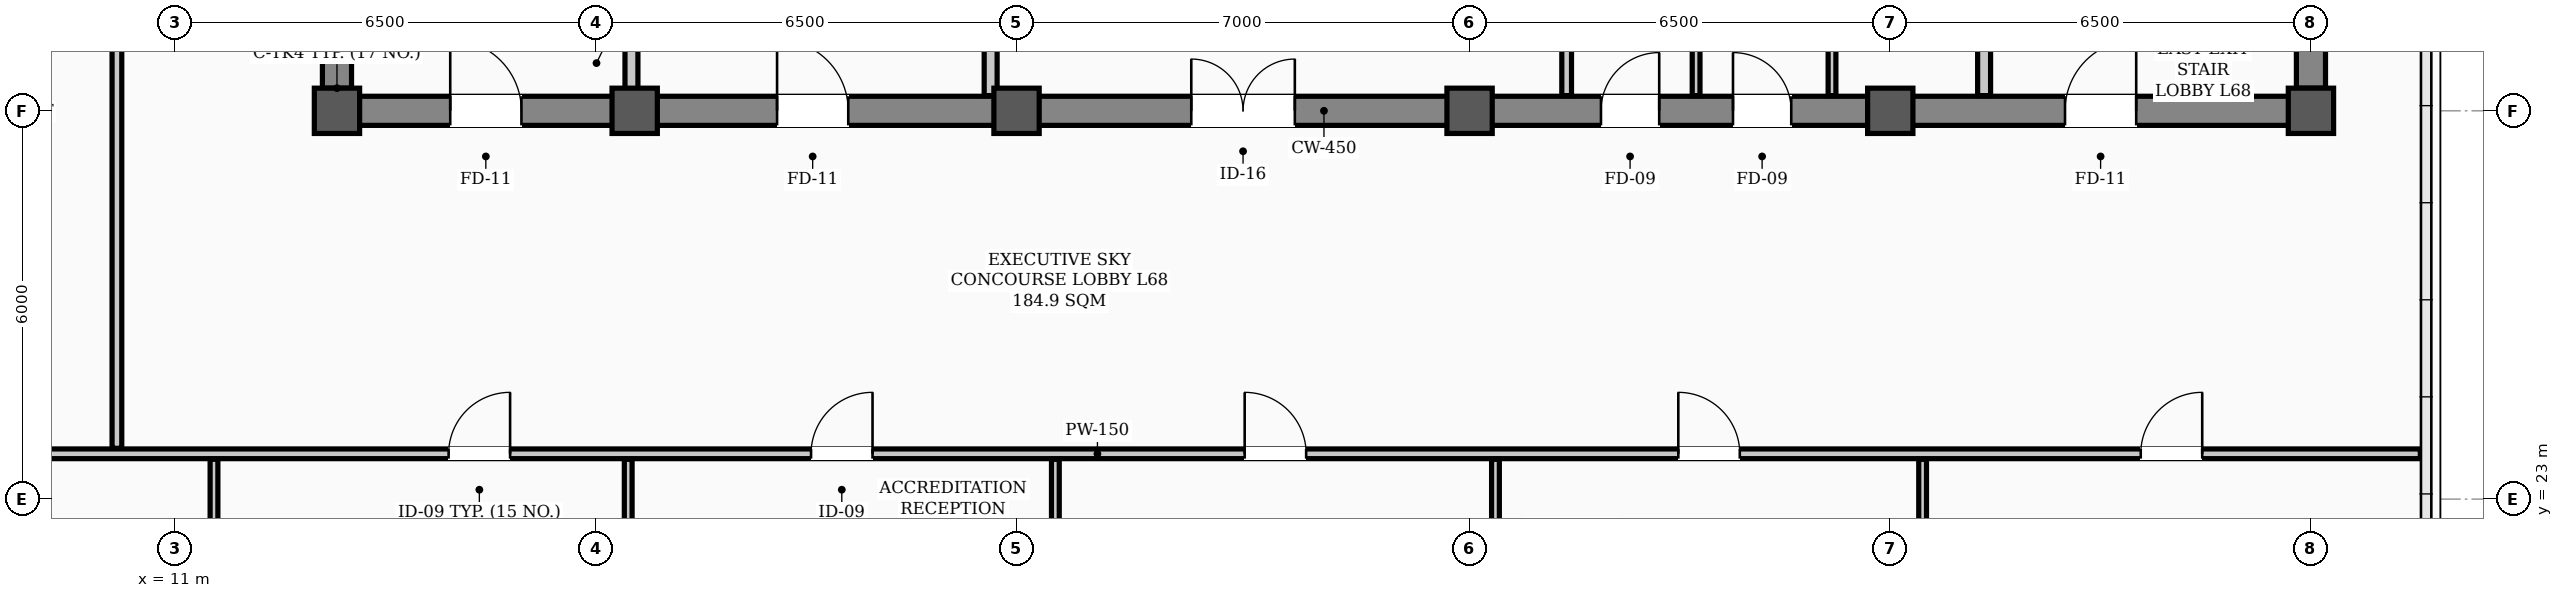
"""IFC4 building model, lengths in metres.
Left out: names, types, materials, properties, quantities, classifications, styles, units other than length and angle.
Written with IfcOpenShell. Run it as: python <this file> out.ifc"""

import sys

from ifc_helpers import new_model, si_unit, direction, frame, frame_2d, origin, origin_2d, place, context, subcontext, project, spatial, rectangle, hollow_rectangle, extrude, element, fill, save


model = new_model("IFC4")
c1 = context("Model", 3, precision=1e-05, world=origin(), true_north=direction((0.0, 1.0)))
c2 = subcontext(c1, "Body", "Model", "MODEL_VIEW")
j1 = project(units=[si_unit("LENGTHUNIT", "METRE"), si_unit("PLANEANGLEUNIT", "RADIAN")], contexts=[c1])
p1 = place(None, origin())
s1 = spatial("IfcSite", under=j1, at=p1, CompositionType="ELEMENT")
p2 = place(p1, origin())
s2 = spatial("IfcBuilding", under=s1, at=p2, CompositionType="ELEMENT")
p3 = place(p2, frame((0.0, 0.0, 273.5)))
s3 = spatial("IfcBuildingStorey", under=s2, at=p3, CompositionType="ELEMENT", Elevation=273.5)
for number, where, z_axis, x_axis in (
    (1, (13.5, 29.0, 0.0), (0.0, 0.0, 1.0), (1.0, 0.0, 0.0)),
    (2, (18.1, 29.0, 0.0), (0.0, 0.0, 1.0), (1.0, 0.0, 0.0)),
    (3, (24.0, 29.0, 0.0), (0.0, 0.0, 1.0), (1.0, 0.0, 0.0)),
    (4, (31.0, 29.0, 0.0), (0.0, 0.0, 1.0), (1.0, 0.0, 0.0)),
    (5, (37.5, 29.0, 0.0), (0.0, 0.0, 1.0), (1.0, 0.0, 0.0)),
    (6, (44.0, 29.0, 0.0), (0.0, 0.0, 1.0), (1.0, 0.0, 0.0)),
):
    element("IfcColumn", number, at=place(p3, frame(where, z_axis=z_axis, x_axis=x_axis)), inside=s3, PredefinedType="COLUMN", context=c2, shape_type="SweptSolid", body=[
        extrude(hollow_rectangle(XDim=0.7, YDim=0.7, WallThickness=0.028, InnerFilletRadius=0.014, OuterFilletRadius=0.042, at=origin_2d()), origin(), (0.0, 0.0, 1.0), 3.9),
    ])
p4 = place(p3, frame((13.5, 29.0, 0.0), z_axis=(0.0, 0.0, 1.0), x_axis=(1.0, 0.0, 0.0)))
e7 = element("IfcWall", 7, at=p4, inside=s3, PredefinedType="SHEAR", context=c2, shape_type="SweptSolid", body=[
    extrude(rectangle(XDim=30.5, YDim=0.45, at=frame_2d((15.25, 0.0))), origin(), (0.0, 0.0, 1.0), 3.72),
])
p5 = place(p4, frame((1.75, 0.0, 0.0)))
e8 = element("IfcOpeningElement", 8, at=p5, cuts=e7, PredefinedType="OPENING", context=c2, shape_type="SweptSolid", body=[
    extrude(rectangle(XDim=1.1, YDim=2.08, at=frame_2d((0.55, 1.04))), frame((0.0, 0.235, 0.0), z_axis=(0.0, -1.0, 0.0), x_axis=(1.0, 0.0, 0.0)), (0.0, 0.0, 1.0), 0.47),
])
p6 = place(p4, frame((26.7, 0.0, 0.0)))
e9 = element("IfcOpeningElement", 9, at=p6, cuts=e7, PredefinedType="OPENING", context=c2, shape_type="SweptSolid", body=[
    extrude(rectangle(XDim=1.1, YDim=2.08, at=frame_2d((0.55, 1.04))), frame((0.0, 0.235, 0.0), z_axis=(0.0, -1.0, 0.0), x_axis=(1.0, 0.0, 0.0)), (0.0, 0.0, 1.0), 0.47),
])
p7 = place(p4, frame((6.8, 0.0, 0.0)))
e10 = element("IfcOpeningElement", 10, at=p7, cuts=e7, PredefinedType="OPENING", context=c2, shape_type="SweptSolid", body=[
    extrude(rectangle(XDim=1.1, YDim=2.08, at=frame_2d((0.55, 1.04))), frame((0.0, 0.235, 0.0), z_axis=(0.0, -1.0, 0.0), x_axis=(1.0, 0.0, 0.0)), (0.0, 0.0, 1.0), 0.47),
])
p8 = place(p4, frame((13.2, 0.0, 0.0)))
e11 = element("IfcOpeningElement", 11, at=p8, cuts=e7, PredefinedType="OPENING", context=c2, shape_type="SweptSolid", body=[
    extrude(rectangle(XDim=1.6, YDim=2.08, at=frame_2d((0.8, 1.04))), frame((0.0, 0.235, 0.0), z_axis=(0.0, -1.0, 0.0), x_axis=(1.0, 0.0, 0.0)), (0.0, 0.0, 1.0), 0.47),
])
p9 = place(p4, frame((19.53, 0.0, 0.0)))
e12 = element("IfcOpeningElement", 12, at=p9, cuts=e7, PredefinedType="OPENING", context=c2, shape_type="SweptSolid", body=[
    extrude(rectangle(XDim=0.9, YDim=2.08, at=frame_2d((0.45, 1.04))), frame((0.0, 0.235, 0.0), z_axis=(0.0, -1.0, 0.0), x_axis=(1.0, 0.0, 0.0)), (0.0, 0.0, 1.0), 0.47),
])
p10 = place(p4, frame((21.57, 0.0, 0.0)))
e13 = element("IfcOpeningElement", 13, at=p10, cuts=e7, PredefinedType="OPENING", context=c2, shape_type="SweptSolid", body=[
    extrude(rectangle(XDim=0.9, YDim=2.08, at=frame_2d((0.45, 1.04))), frame((0.0, 0.235, 0.0), z_axis=(0.0, -1.0, 0.0), x_axis=(1.0, 0.0, 0.0)), (0.0, 0.0, 1.0), 0.47),
])
for number, where, z_axis, x_axis in (
    (14, (13.5, 29.35, 0.0), (0.0, 0.0, 1.0), (0.0, 1.0, 0.0)),
    (15, (44.0, 29.35, 0.0), (0.0, 0.0, 1.0), (0.0, 1.0, 0.0)),
):
    element("IfcWall", number, at=place(p3, frame(where, z_axis=z_axis, x_axis=x_axis)), inside=s3, PredefinedType="SHEAR", context=c2, shape_type="SweptSolid", body=[
        extrude(rectangle(XDim=8.6, YDim=0.45, at=frame_2d((4.3, 0.0))), origin(), (0.0, 0.0, 1.0), 3.72),
    ])
p11 = place(p3, frame((4.81, 23.7, 0.0), z_axis=(0.0, 0.0, 1.0), x_axis=(1.0, 0.0, 0.0)))
e16 = element("IfcWall", 16, at=p11, inside=s3, PredefinedType="PARTITIONING", context=c2, shape_type="SweptSolid", body=[
    extrude(rectangle(XDim=40.88, YDim=0.15, at=frame_2d((20.44, 0.0))), origin(), (0.0, 0.0, 1.0), 3.2),
])
p12 = place(p11, frame((10.415, 0.0, 0.0)))
e17 = element("IfcOpeningElement", 17, at=p12, cuts=e16, PredefinedType="OPENING", context=c2, shape_type="SweptSolid", body=[
    extrude(rectangle(XDim=0.95, YDim=2.08, at=frame_2d((0.475, 1.04))), frame((0.0, 0.085, 0.0), z_axis=(0.0, -1.0, 0.0), x_axis=(1.0, 0.0, 0.0)), (0.0, 0.0, 1.0), 0.17),
])
p13 = place(p11, frame((16.015, 0.0, 0.0)))
e18 = element("IfcOpeningElement", 18, at=p13, cuts=e16, PredefinedType="OPENING", context=c2, shape_type="SweptSolid", body=[
    extrude(rectangle(XDim=0.95, YDim=2.08, at=frame_2d((0.475, 1.04))), frame((0.0, 0.085, 0.0), z_axis=(0.0, -1.0, 0.0), x_axis=(1.0, 0.0, 0.0)), (0.0, 0.0, 1.0), 0.17),
])
p14 = place(p11, frame((22.715, 0.0, 0.0)))
e19 = element("IfcOpeningElement", 19, at=p14, cuts=e16, PredefinedType="OPENING", context=c2, shape_type="SweptSolid", body=[
    extrude(rectangle(XDim=0.95, YDim=2.08, at=frame_2d((0.475, 1.04))), frame((0.0, 0.085, 0.0), z_axis=(0.0, -1.0, 0.0), x_axis=(1.0, 0.0, 0.0)), (0.0, 0.0, 1.0), 0.17),
])
p15 = place(p11, frame((29.415, 0.0, 0.0)))
e20 = element("IfcOpeningElement", 20, at=p15, cuts=e16, PredefinedType="OPENING", context=c2, shape_type="SweptSolid", body=[
    extrude(rectangle(XDim=0.95, YDim=2.08, at=frame_2d((0.475, 1.04))), frame((0.0, 0.085, 0.0), z_axis=(0.0, -1.0, 0.0), x_axis=(1.0, 0.0, 0.0)), (0.0, 0.0, 1.0), 0.17),
])
p16 = place(p11, frame((36.56, 0.0, 0.0)))
e21 = element("IfcOpeningElement", 21, at=p16, cuts=e16, PredefinedType="OPENING", context=c2, shape_type="SweptSolid", body=[
    extrude(rectangle(XDim=0.95, YDim=2.08, at=frame_2d((0.475, 1.04))), frame((0.0, 0.085, 0.0), z_axis=(0.0, -1.0, 0.0), x_axis=(1.0, 0.0, 0.0)), (0.0, 0.0, 1.0), 0.17),
])
p17 = place(p3, frame((18.05, 29.235, 0.0), z_axis=(0.0, 0.0, 1.0), x_axis=(0.0, 1.0, 0.0)))
e22 = element("IfcWall", 22, at=p17, inside=s3, PredefinedType="STANDARD", context=c2, shape_type="SweptSolid", body=[
    extrude(rectangle(XDim=1.065, YDim=0.2, at=frame_2d((0.532, 0.0))), origin(), (0.0, 0.0, 1.0), 3.4),
])
p18 = place(p3, frame((38.95, 29.235, 0.0), z_axis=(0.0, 0.0, 1.0), x_axis=(0.0, 1.0, 0.0)))
e23 = element("IfcWall", 23, at=p18, inside=s3, PredefinedType="STANDARD", context=c2, shape_type="SweptSolid", body=[
    extrude(rectangle(XDim=1.065, YDim=0.2, at=frame_2d((0.532, 0.0))), origin(), (0.0, 0.0, 1.0), 3.72),
])
p19 = place(p3, frame((23.6, 29.235, 0.0), z_axis=(0.0, 0.0, 1.0), x_axis=(0.0, 1.0, 0.0)))
e24 = element("IfcWall", 24, at=p19, inside=s3, PredefinedType="STANDARD", context=c2, shape_type="SweptSolid", body=[
    extrude(rectangle(XDim=5.465, YDim=0.2, at=frame_2d((2.732, 0.0))), origin(), (0.0, 0.0, 1.0), 3.2),
])
p20 = place(p3, frame((32.5, 29.235, 0.0), z_axis=(0.0, 0.0, 1.0), x_axis=(0.0, 1.0, 0.0)))
e25 = element("IfcWall", 25, at=p20, inside=s3, PredefinedType="PARTITIONING", context=c2, shape_type="SweptSolid", body=[
    extrude(rectangle(XDim=2.53, YDim=0.15, at=frame_2d((1.265, 0.0))), origin(), (0.0, 0.0, 1.0), 3.4),
])
for number, where, z_axis, x_axis in (
    (26, (36.6, 29.235, 0.0), (0.0, 0.0, 1.0), (0.0, 1.0, 0.0)),
    (27, (34.5, 29.235, 0.0), (0.0, 0.0, 1.0), (0.0, 1.0, 0.0)),
):
    element("IfcWall", number, at=place(p3, frame(where, z_axis=z_axis, x_axis=x_axis)), inside=s3, PredefinedType="PARTITIONING", context=c2, shape_type="SweptSolid", body=[
        extrude(rectangle(XDim=2.53, YDim=0.12, at=frame_2d((1.265, 0.0))), origin(), (0.0, 0.0, 1.0), 3.4),
    ])
p21 = place(p3, frame((10.1, 23.785, 0.0), z_axis=(0.0, 0.0, 1.0), x_axis=(0.0, 1.0, 0.0)))
e28 = element("IfcWall", 28, at=p21, inside=s3, PredefinedType="PARTITIONING", context=c2, shape_type="SweptSolid", body=[
    extrude(rectangle(XDim=17.88, YDim=0.15, at=frame_2d((8.94, 0.0))), origin(), (0.0, 0.0, 1.0), 3.1),
])
p22 = place(p21, frame((8.465, 0.0, 0.0)))
e29 = element("IfcOpeningElement", 29, at=p22, cuts=e28, PredefinedType="OPENING", context=c2, shape_type="SweptSolid", body=[
    extrude(rectangle(XDim=0.95, YDim=2.08, at=frame_2d((0.475, 1.04))), frame((0.0, 0.085, 0.0), z_axis=(0.0, -1.0, 0.0), x_axis=(1.0, 0.0, 0.0)), (0.0, 0.0, 1.0), 0.17),
])
p23 = place(p3, frame((11.6, 17.91, 0.0), z_axis=(0.0, 0.0, 1.0), x_axis=(0.0, 1.0, 0.0)))
e30 = element("IfcWall", 30, at=p23, inside=s3, PredefinedType="PARTITIONING", context=c2, shape_type="SweptSolid", body=[
    extrude(rectangle(XDim=5.705, YDim=0.12, at=frame_2d((2.853, 0.0))), origin(), (0.0, 0.0, 1.0), 3.72),
])
p24 = place(p23, frame((3.815, 0.0, 0.0)))
e31 = element("IfcOpeningElement", 31, at=p24, cuts=e30, PredefinedType="OPENING", context=c2, shape_type="SweptSolid", body=[
    extrude(rectangle(XDim=0.95, YDim=2.08, at=frame_2d((0.475, 1.04))), frame((0.0, 0.07, 0.0), z_axis=(0.0, -1.0, 0.0), x_axis=(1.0, 0.0, 0.0)), (0.0, 0.0, 1.0), 0.14),
])
p25 = place(p3, frame((18.0, 17.91, 0.0), z_axis=(0.0, 0.0, 1.0), x_axis=(0.0, 1.0, 0.0)))
e32 = element("IfcWall", 32, at=p25, inside=s3, PredefinedType="PARTITIONING", context=c2, shape_type="SweptSolid", body=[
    extrude(rectangle(XDim=5.705, YDim=0.12, at=frame_2d((2.853, 0.0))), origin(), (0.0, 0.0, 1.0), 3.1),
])
p26 = place(p3, frame((24.6, 19.67, 0.0), z_axis=(0.0, 0.0, 1.0), x_axis=(0.0, 1.0, 0.0)))
e33 = element("IfcWall", 33, at=p26, inside=s3, PredefinedType="PARTITIONING", context=c2, shape_type="SweptSolid", body=[
    extrude(rectangle(XDim=3.945, YDim=0.12, at=frame_2d((1.973, 0.0))), origin(), (0.0, 0.0, 1.0), 3.1),
])
for number, where, z_axis, x_axis in (
    (34, (31.4, 17.91, 0.0), (0.0, 0.0, 1.0), (0.0, 1.0, 0.0)),
    (35, (38.0, 17.91, 0.0), (0.0, 0.0, 1.0), (0.0, 1.0, 0.0)),
):
    element("IfcWall", number, at=place(p3, frame(where, z_axis=z_axis, x_axis=x_axis)), inside=s3, PredefinedType="PARTITIONING", context=c2, shape_type="SweptSolid", body=[
        extrude(rectangle(XDim=5.705, YDim=0.12, at=frame_2d((2.853, 0.0))), origin(), (0.0, 0.0, 1.0), 3.1),
    ])
p27 = place(p5, origin())
e36 = element("IfcDoor", 36, at=p27, inside=s3, OperationType="SINGLE_SWING_LEFT", PredefinedType="DOOR", context=c2, shape_type="SweptSolid", body=[
    extrude(rectangle(XDim=1.1, YDim=2.08, at=frame_2d((0.55, 1.04))), frame((0.0, 0.025, 0.0), z_axis=(0.0, -1.0, 0.0), x_axis=(1.0, 0.0, 0.0)), (0.0, 0.0, 1.0), 0.05),
])
fill(e8, e36)
p28 = place(p6, origin())
e37 = element("IfcDoor", 37, at=p28, inside=s3, OperationType="SINGLE_SWING_RIGHT", PredefinedType="DOOR", context=c2, shape_type="SweptSolid", body=[
    extrude(rectangle(XDim=1.1, YDim=2.08, at=frame_2d((0.55, 1.04))), frame((0.0, 0.025, 0.0), z_axis=(0.0, -1.0, 0.0), x_axis=(1.0, 0.0, 0.0)), (0.0, 0.0, 1.0), 0.05),
])
fill(e9, e37)
p29 = place(p7, origin())
e38 = element("IfcDoor", 38, at=p29, inside=s3, OperationType="SINGLE_SWING_LEFT", PredefinedType="DOOR", context=c2, shape_type="SweptSolid", body=[
    extrude(rectangle(XDim=1.1, YDim=2.08, at=frame_2d((0.55, 1.04))), frame((0.0, 0.025, 0.0), z_axis=(0.0, -1.0, 0.0), x_axis=(1.0, 0.0, 0.0)), (0.0, 0.0, 1.0), 0.05),
])
fill(e10, e38)
p30 = place(p8, origin())
e39 = element("IfcDoor", 39, at=p30, inside=s3, OperationType="DOUBLE_DOOR_SINGLE_SWING", PredefinedType="DOOR", context=c2, shape_type="SweptSolid", body=[
    extrude(rectangle(XDim=1.6, YDim=2.08, at=frame_2d((0.8, 1.04))), frame((0.0, 0.025, 0.0), z_axis=(0.0, -1.0, 0.0), x_axis=(1.0, 0.0, 0.0)), (0.0, 0.0, 1.0), 0.05),
])
fill(e11, e39)
p31 = place(p9, origin())
e40 = element("IfcDoor", 40, at=p31, inside=s3, OperationType="SINGLE_SWING_RIGHT", PredefinedType="DOOR", context=c2, shape_type="SweptSolid", body=[
    extrude(rectangle(XDim=0.9, YDim=2.08, at=frame_2d((0.45, 1.04))), frame((0.0, 0.025, 0.0), z_axis=(0.0, -1.0, 0.0), x_axis=(1.0, 0.0, 0.0)), (0.0, 0.0, 1.0), 0.05),
])
fill(e12, e40)
p32 = place(p10, origin())
e41 = element("IfcDoor", 41, at=p32, inside=s3, OperationType="SINGLE_SWING_LEFT", PredefinedType="DOOR", context=c2, shape_type="SweptSolid", body=[
    extrude(rectangle(XDim=0.9, YDim=2.08, at=frame_2d((0.45, 1.04))), frame((0.0, 0.025, 0.0), z_axis=(0.0, -1.0, 0.0), x_axis=(1.0, 0.0, 0.0)), (0.0, 0.0, 1.0), 0.05),
])
fill(e13, e41)
p33 = place(p12, origin())
e42 = element("IfcDoor", 42, at=p33, inside=s3, OperationType="SINGLE_SWING_RIGHT", PredefinedType="DOOR", context=c2, shape_type="SweptSolid", body=[
    extrude(rectangle(XDim=0.95, YDim=2.08, at=frame_2d((0.475, 1.04))), frame((0.0, 0.025, 0.0), z_axis=(0.0, -1.0, 0.0), x_axis=(1.0, 0.0, 0.0)), (0.0, 0.0, 1.0), 0.05),
])
fill(e17, e42)
p34 = place(p13, origin())
e43 = element("IfcDoor", 43, at=p34, inside=s3, OperationType="SINGLE_SWING_RIGHT", PredefinedType="DOOR", context=c2, shape_type="SweptSolid", body=[
    extrude(rectangle(XDim=0.95, YDim=2.08, at=frame_2d((0.475, 1.04))), frame((0.0, 0.025, 0.0), z_axis=(0.0, -1.0, 0.0), x_axis=(1.0, 0.0, 0.0)), (0.0, 0.0, 1.0), 0.05),
])
fill(e18, e43)
p35 = place(p14, origin())
e44 = element("IfcDoor", 44, at=p35, inside=s3, OperationType="SINGLE_SWING_LEFT", PredefinedType="DOOR", context=c2, shape_type="SweptSolid", body=[
    extrude(rectangle(XDim=0.95, YDim=2.08, at=frame_2d((0.475, 1.04))), frame((0.0, 0.025, 0.0), z_axis=(0.0, -1.0, 0.0), x_axis=(1.0, 0.0, 0.0)), (0.0, 0.0, 1.0), 0.05),
])
fill(e19, e44)
p36 = place(p15, origin())
e45 = element("IfcDoor", 45, at=p36, inside=s3, OperationType="SINGLE_SWING_LEFT", PredefinedType="DOOR", context=c2, shape_type="SweptSolid", body=[
    extrude(rectangle(XDim=0.95, YDim=2.08, at=frame_2d((0.475, 1.04))), frame((0.0, 0.025, 0.0), z_axis=(0.0, -1.0, 0.0), x_axis=(1.0, 0.0, 0.0)), (0.0, 0.0, 1.0), 0.05),
])
fill(e20, e45)
p37 = place(p16, origin())
e46 = element("IfcDoor", 46, at=p37, inside=s3, OperationType="SINGLE_SWING_RIGHT", PredefinedType="DOOR", context=c2, shape_type="SweptSolid", body=[
    extrude(rectangle(XDim=0.95, YDim=2.08, at=frame_2d((0.475, 1.04))), frame((0.0, 0.025, 0.0), z_axis=(0.0, -1.0, 0.0), x_axis=(1.0, 0.0, 0.0)), (0.0, 0.0, 1.0), 0.05),
])
fill(e21, e46)
save(model, sys.argv[1])
